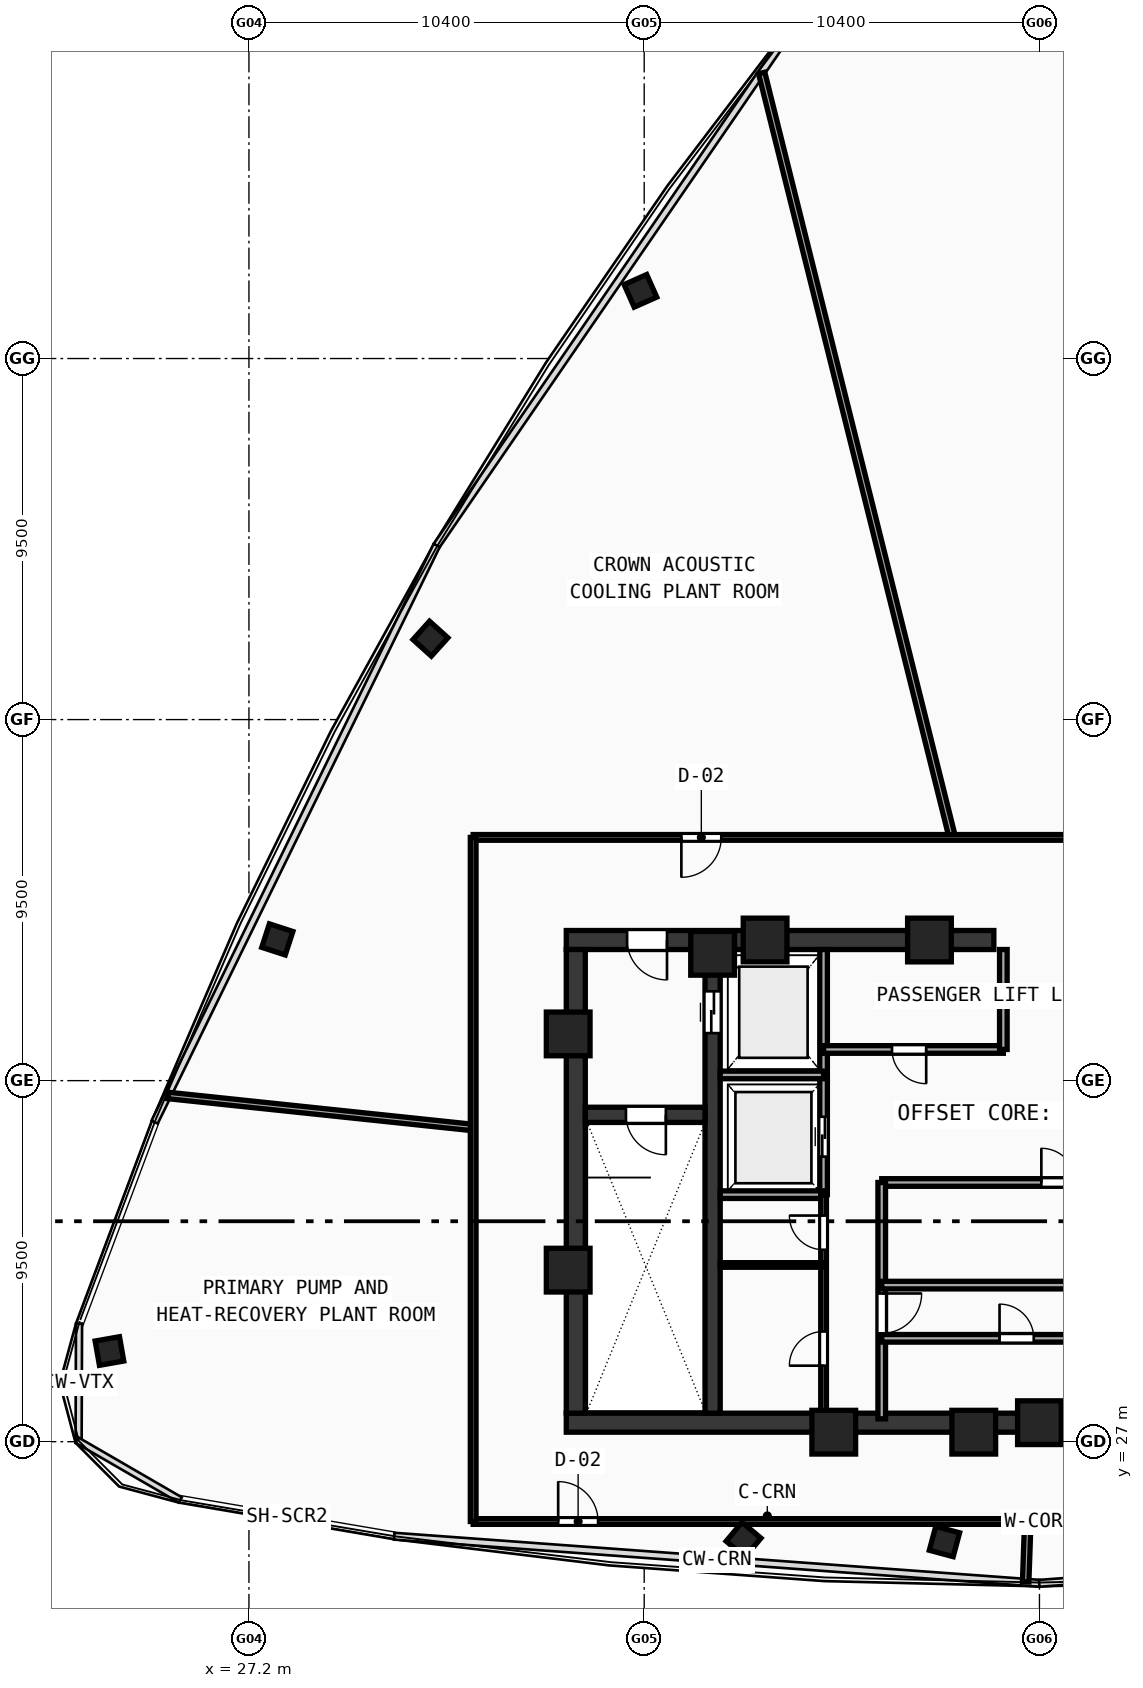
"""IFC4 building model, lengths in metres.
Left out: names, types, materials, properties, quantities, classifications, styles, units other than length and angle.
Written with IfcOpenShell. Run it as: python <this file> out.ifc"""

import sys

from ifc_helpers import new_model, si_unit, direction, frame, frame_2d, origin, origin_with_axes, origin_2d, place, context, subcontext, project, spatial, rectangle, hollow_rectangle, extrude, source, transform, mapped, element, fill, save


model = new_model("IFC4")
c1 = context("Model", 3, precision=1e-05, world=origin(), true_north=direction((0.0, 1.0)))
c2 = subcontext(c1, "Body", "Model", "MODEL_VIEW")
j1 = project(units=[si_unit("LENGTHUNIT", "METRE"), si_unit("PLANEANGLEUNIT", "RADIAN")], contexts=[c1])
p1 = place(None, origin())
s1 = spatial("IfcSite", under=j1, at=p1, CompositionType="ELEMENT")
p2 = place(p1, origin())
s2 = spatial("IfcBuilding", under=s1, at=p2, CompositionType="ELEMENT")
p3 = place(p2, frame((0.0, 0.0, 396.76)))
s3 = spatial("IfcBuildingStorey", under=s2, at=p3, CompositionType="ELEMENT", Elevation=396.76)
p4 = place(p3, frame((35.55, 27.5, 0.0), z_axis=(0.0, 0.0, 1.0), x_axis=(1.0, 0.0, 0.0)))
e1 = element("IfcWall", 1, at=p4, inside=s3, PredefinedType="SHEAR", context=c2, shape_type="SweptSolid", body=[
    extrude(rectangle(XDim=24.9, YDim=0.5, at=frame_2d((12.45, 0.0))), origin(), (0.0, 0.0, 1.0), 4.72),
])
p5 = place(p3, frame((35.55, 40.2, 0.0), z_axis=(0.0, 0.0, 1.0), x_axis=(1.0, 0.0, 0.0)))
e2 = element("IfcWall", 2, at=p5, inside=s3, PredefinedType="SHEAR", context=c2, shape_type="SweptSolid", body=[
    extrude(rectangle(XDim=11.25, YDim=0.5, at=frame_2d((5.625, 0.0))), origin(), (0.0, 0.0, 1.0), 4.72),
])
p6 = place(p5, frame((1.6, 0.0, 0.0)))
e3 = element("IfcOpeningElement", 3, at=p6, cuts=e2, PredefinedType="OPENING", context=c2, shape_type="SweptSolid", body=[
    extrude(rectangle(XDim=1.05, YDim=2.1, at=frame_2d((0.525, 1.05))), frame((0.0, 0.26, 0.0), z_axis=(0.0, -1.0, 0.0), x_axis=(1.0, 0.0, 0.0)), (0.0, 0.0, 1.0), 0.52),
])
p7 = place(p3, frame((35.8, 27.75, 0.0), z_axis=(0.0, 0.0, 1.0), x_axis=(0.0, 1.0, 0.0)))
e4 = element("IfcWall", 4, at=p7, inside=s3, PredefinedType="SHEAR", context=c2, shape_type="SweptSolid", body=[
    extrude(rectangle(XDim=12.2, YDim=0.5, at=frame_2d((6.1, 0.0))), origin(), (0.0, 0.0, 1.0), 4.72),
])
p8 = place(p3, frame((39.4, 27.75, 0.0), z_axis=(0.0, 0.0, 1.0), x_axis=(0.0, 1.0, 0.0)))
e5 = element("IfcWall", 5, at=p8, inside=s3, PredefinedType="SHEAR", context=c2, shape_type="SweptSolid", body=[
    extrude(rectangle(XDim=12.2, YDim=0.4, at=frame_2d((6.1, 0.0))), origin(), (0.0, 0.0, 1.0), 4.72),
])
p9 = place(p8, frame((10.0, 0.0, 0.0)))
e6 = element("IfcOpeningElement", 6, at=p9, cuts=e5, PredefinedType="OPENING", context=c2, shape_type="SweptSolid", body=[
    extrude(rectangle(XDim=1.1, YDim=2.1, at=frame_2d((0.55, 1.05))), frame((0.0, 0.21, 0.0), z_axis=(0.0, -1.0, 0.0), x_axis=(1.0, 0.0, 0.0)), (0.0, 0.0, 1.0), 0.42),
])
p10 = place(p3, frame((36.05, 35.6, 0.0), z_axis=(0.0, 0.0, 1.0), x_axis=(1.0, 0.0, 0.0)))
e7 = element("IfcWall", 7, at=p10, inside=s3, PredefinedType="SHEAR", context=c2, shape_type="SweptSolid", body=[
    extrude(rectangle(XDim=3.15, YDim=0.4, at=frame_2d((1.575, 0.0))), origin(), (0.0, 0.0, 1.0), 4.72),
])
p11 = place(p10, frame((1.07, 0.0, 0.0)))
e8 = element("IfcOpeningElement", 8, at=p11, cuts=e7, PredefinedType="OPENING", context=c2, shape_type="SweptSolid", body=[
    extrude(rectangle(XDim=1.05, YDim=2.1, at=frame_2d((0.525, 1.05))), frame((0.0, 0.21, 0.0), z_axis=(0.0, -1.0, 0.0), x_axis=(1.0, 0.0, 0.0)), (0.0, 0.0, 1.0), 0.42),
])
m1 = source(origin(), c2, "Body", "SweptSolid", [
    extrude(hollow_rectangle(XDim=1.15, YDim=1.15, WallThickness=0.048, at=origin_2d()), origin(), (0.0, 0.0, 1.0), 5.0),
])
for number, where, z_axis, x_axis in (
    (9, (42.588, 27.25, -0.28), (0.0, 0.0, 1.0), (1.0, 0.0, 0.0)),
    (10, (46.272, 27.25, -0.28), (0.0, 0.0, 1.0), (1.0, 0.0, 0.0)),
    (11, (45.106, 40.2, -0.28), (0.0, 0.0, 1.0), (1.0, 0.0, 0.0)),
    (12, (40.781, 40.2, -0.28), (0.0, 0.0, 1.0), (1.0, 0.0, 0.0)),
    (13, (35.6, 37.729, -0.28), (0.0, 0.0, 1.0), (1.0, 0.0, 0.0)),
    (14, (35.6, 31.513, -0.28), (0.0, 0.0, 1.0), (1.0, 0.0, 0.0)),
):
    element("IfcColumn", number, at=place(p3, frame(where, z_axis=z_axis, x_axis=x_axis)), inside=s3, PredefinedType="COLUMN", context=c2, shape_type="MappedRepresentation", body=[
        mapped(m1, transform((0.0, 0.0, 0.0), scale=1.0)),
    ])
m2 = source(origin(), c2, "Body", "SweptSolid", [
    extrude(hollow_rectangle(XDim=0.65, YDim=0.65, WallThickness=0.024, at=origin_2d()), origin(), (0.0, 0.0, 1.0), 5.0),
])
for number, where, z_axis, x_axis in (
    (15, (40.215, 24.422, -0.28), (0.0, 0.0, 1.0), (0.766, -0.643, 0.0)),
    (16, (45.501, 24.373, -0.28), (0.0, 0.0, 1.0), (0.966, -0.259, 0.0)),
    (17, (37.501, 57.281, -0.28), (0.0, 0.0, 1.0), (-0.914, -0.407, 0.0)),
    (18, (31.975, 48.129, -0.28), (0.0, 0.0, 1.0), (-0.669, -0.743, 0.0)),
    (19, (27.947, 40.216, -0.28), (0.0, 0.0, 1.0), (-0.309, -0.951, 0.0)),
    (20, (23.53, 29.385, -0.28), (0.0, 0.0, 1.0), (0.174, -0.985, 0.0)),
):
    element("IfcColumn", number, at=place(p3, frame(where, z_axis=z_axis, x_axis=x_axis)), inside=s3, PredefinedType="COLUMN", context=c2, shape_type="MappedRepresentation", body=[
        mapped(m2, transform((0.0, 0.0, 0.0), scale=1.0)),
    ])
for number, where, z_axis, x_axis in (
    (21, (39.4, 39.85, -0.28), (0.0, 0.0, 1.0), (1.0, 0.0, 0.0)),
    (22, (48.0, 27.5, -0.28), (0.0, 0.0, 1.0), (1.0, 0.0, 0.0)),
):
    element("IfcColumn", number, at=place(p3, frame(where, z_axis=z_axis, x_axis=x_axis)), inside=s3, PredefinedType="COLUMN", context=c2, shape_type="MappedRepresentation", body=[
        mapped(m1, transform((0.0, 0.0, 0.0), scale=1.0)),
    ])
p12 = place(p3, frame((42.32, 33.5, 0.0), z_axis=(0.0, 0.0, 1.0), x_axis=(0.0, 1.0, 0.0)))
e23 = element("IfcWall", 23, at=p12, inside=s3, PredefinedType="SOLIDWALL", context=c2, shape_type="SweptSolid", body=[
    extrude(rectangle(XDim=6.45, YDim=0.2, at=frame_2d((3.225, 0.0))), origin(), (0.0, 0.0, 1.0), 4.72),
])
p13 = place(p12, frame((1.0, 0.0, 0.0)))
e24 = element("IfcOpeningElement", 24, at=p13, cuts=e23, PredefinedType="OPENING", context=c2, shape_type="SweptSolid", body=[
    extrude(rectangle(XDim=1.05, YDim=2.1, at=frame_2d((0.525, 1.05))), frame((0.0, 0.11, 0.0), z_axis=(0.0, -1.0, 0.0), x_axis=(1.0, 0.0, 0.0)), (0.0, 0.0, 1.0), 0.22),
])
for number, where, z_axis, x_axis in (
    (25, (39.6, 36.65, 0.0), (0.0, 0.0, 1.0), (1.0, 0.0, 0.0)),
    (26, (39.6, 33.5, 0.0), (0.0, 0.0, 1.0), (1.0, 0.0, 0.0)),
):
    element("IfcWall", number, at=place(p3, frame(where, z_axis=z_axis, x_axis=x_axis)), inside=s3, PredefinedType="SOLIDWALL", context=c2, shape_type="SweptSolid", body=[
        extrude(rectangle(XDim=2.72, YDim=0.2, at=frame_2d((1.36, 0.0))), origin(), (0.0, 0.0, 1.0), 4.72),
    ])
p14 = place(p3, frame((42.32, 37.32, 0.0), z_axis=(0.0, 0.0, 1.0), x_axis=(1.0, 0.0, 0.0)))
e27 = element("IfcWall", 27, at=p14, inside=s3, PredefinedType="SOLIDWALL", context=c2, shape_type="SweptSolid", body=[
    extrude(rectangle(XDim=4.73, YDim=0.2, at=frame_2d((2.365, 0.0))), origin(), (0.0, 0.0, 1.0), 4.72),
])
p15 = place(p14, frame((1.8, 0.0, 0.0)))
e28 = element("IfcOpeningElement", 28, at=p15, cuts=e27, PredefinedType="OPENING", context=c2, shape_type="SweptSolid", body=[
    extrude(rectangle(XDim=0.9, YDim=2.1, at=frame_2d((0.45, 1.05))), frame((0.0, 0.11, 0.0), z_axis=(0.0, -1.0, 0.0), x_axis=(1.0, 0.0, 0.0)), (0.0, 0.0, 1.0), 0.22),
])
p16 = place(p3, frame((47.05, 37.32, 0.0), z_axis=(0.0, 0.0, 1.0), x_axis=(0.0, 1.0, 0.0)))
e29 = element("IfcWall", 29, at=p16, inside=s3, PredefinedType="SOLIDWALL", context=c2, shape_type="SweptSolid", body=[
    extrude(rectangle(XDim=2.63, YDim=0.2, at=frame_2d((1.315, 0.0))), origin(), (0.0, 0.0, 1.0), 4.72),
])
p17 = place(p3, frame((43.85, 33.82, 0.0), z_axis=(0.0, 0.0, 1.0), x_axis=(1.0, 0.0, 0.0)))
e30 = element("IfcWall", 30, at=p17, inside=s3, PredefinedType="SOLIDWALL", context=c2, shape_type="SweptSolid", body=[
    extrude(rectangle(XDim=9.83, YDim=0.2, at=frame_2d((4.915, 0.0))), origin(), (0.0, 0.0, 1.0), 4.72),
])
p18 = place(p17, frame((4.2, 0.0, 0.0)))
e31 = element("IfcOpeningElement", 31, at=p18, cuts=e30, PredefinedType="OPENING", context=c2, shape_type="SweptSolid", body=[
    extrude(rectangle(XDim=0.9, YDim=2.1, at=frame_2d((0.45, 1.05))), frame((0.0, 0.11, 0.0), z_axis=(0.0, -1.0, 0.0), x_axis=(1.0, 0.0, 0.0)), (0.0, 0.0, 1.0), 0.22),
])
p19 = place(p3, frame((43.85, 27.6, 0.0), z_axis=(0.0, 0.0, 1.0), x_axis=(0.0, 1.0, 0.0)))
e32 = element("IfcWall", 32, at=p19, inside=s3, PredefinedType="SOLIDWALL", context=c2, shape_type="SweptSolid", body=[
    extrude(rectangle(XDim=6.22, YDim=0.2, at=frame_2d((3.11, 0.0))), origin(), (0.0, 0.0, 1.0), 4.72),
])
p20 = place(p19, frame((2.25, 0.0, 0.0)))
e33 = element("IfcOpeningElement", 33, at=p20, cuts=e32, PredefinedType="OPENING", context=c2, shape_type="SweptSolid", body=[
    extrude(rectangle(XDim=1.05, YDim=2.1, at=frame_2d((0.525, 1.05))), frame((0.0, 0.11, 0.0), z_axis=(0.0, -1.0, 0.0), x_axis=(1.0, 0.0, 0.0)), (0.0, 0.0, 1.0), 0.22),
])
p21 = place(p3, frame((43.85, 29.72, 0.0), z_axis=(0.0, 0.0, 1.0), x_axis=(1.0, 0.0, 0.0)))
e34 = element("IfcWall", 34, at=p21, inside=s3, PredefinedType="SOLIDWALL", context=c2, shape_type="SweptSolid", body=[
    extrude(rectangle(XDim=7.2, YDim=0.2, at=frame_2d((3.6, 0.0))), origin(), (0.0, 0.0, 1.0), 4.72),
])
p22 = place(p21, frame((3.1, 0.0, 0.0)))
e35 = element("IfcOpeningElement", 35, at=p22, cuts=e34, PredefinedType="OPENING", context=c2, shape_type="SweptSolid", body=[
    extrude(rectangle(XDim=0.9, YDim=2.1, at=frame_2d((0.45, 1.05))), frame((0.0, 0.11, 0.0), z_axis=(0.0, -1.0, 0.0), x_axis=(1.0, 0.0, 0.0)), (0.0, 0.0, 1.0), 0.22),
])
p23 = place(p3, frame((43.85, 31.12, 0.0), z_axis=(0.0, 0.0, 1.0), x_axis=(1.0, 0.0, 0.0)))
e36 = element("IfcWall", 36, at=p23, inside=s3, PredefinedType="SOLIDWALL", context=c2, shape_type="SweptSolid", body=[
    extrude(rectangle(XDim=9.83, YDim=0.2, at=frame_2d((4.915, 0.0))), origin(), (0.0, 0.0, 1.0), 4.72),
])
p24 = place(p3, frame((42.32, 27.6, 0.0), z_axis=(0.0, 0.0, 1.0), x_axis=(0.0, 1.0, 0.0)))
e37 = element("IfcWall", 37, at=p24, inside=s3, PredefinedType="PARTITIONING", context=c2, shape_type="SweptSolid", body=[
    extrude(rectangle(XDim=5.9, YDim=0.15, at=frame_2d((2.95, 0.0))), origin(), (0.0, 0.0, 1.0), 4.72),
])
p25 = place(p24, frame((1.4, 0.0, 0.0)))
e38 = element("IfcOpeningElement", 38, at=p25, cuts=e37, PredefinedType="OPENING", context=c2, shape_type="SweptSolid", body=[
    extrude(rectangle(XDim=0.9, YDim=2.1, at=frame_2d((0.45, 1.05))), frame((0.0, 0.085, 0.0), z_axis=(0.0, -1.0, 0.0), x_axis=(1.0, 0.0, 0.0)), (0.0, 0.0, 1.0), 0.17),
])
p26 = place(p24, frame((4.45, 0.0, 0.0)))
e39 = element("IfcOpeningElement", 39, at=p26, cuts=e37, PredefinedType="OPENING", context=c2, shape_type="SweptSolid", body=[
    extrude(rectangle(XDim=0.9, YDim=2.1, at=frame_2d((0.45, 1.05))), frame((0.0, 0.085, 0.0), z_axis=(0.0, -1.0, 0.0), x_axis=(1.0, 0.0, 0.0)), (0.0, 0.0, 1.0), 0.17),
])
p27 = place(p3, frame((39.6, 31.65, 0.0), z_axis=(0.0, 0.0, 1.0), x_axis=(1.0, 0.0, 0.0)))
e40 = element("IfcWall", 40, at=p27, inside=s3, PredefinedType="PARTITIONING", context=c2, shape_type="SweptSolid", body=[
    extrude(rectangle(XDim=2.72, YDim=0.12, at=frame_2d((1.36, 0.0))), origin(), (0.0, 0.0, 1.0), 4.72),
])
p28 = place(p3, frame((45.706, 42.9, 0.0), z_axis=(0.0, 0.0, 1.0), x_axis=(-0.241925907535, 0.970294725979, 0.0)))
e41 = element("IfcWall", 41, at=p28, inside=s3, PredefinedType="PARTITIONING", context=c2, shape_type="SweptSolid", body=[
    extrude(rectangle(XDim=20.729, YDim=0.17, at=frame_2d((10.365, 0.0))), origin(), (0.0, 0.0, 1.0), 4.12),
])
p29 = place(p3, frame((33.1, 35.266, 0.0), z_axis=(0.0, 0.0, 1.0), x_axis=(-0.994521682688, 0.104530486767, 0.0)))
e42 = element("IfcWall", 42, at=p29, inside=s3, PredefinedType="PARTITIONING", context=c2, shape_type="SweptSolid", body=[
    extrude(rectangle(XDim=8.072, YDim=0.17, at=frame_2d((4.036, 0.0))), origin(), (0.0, 0.0, 1.0), 4.12),
])
p30 = place(p3, frame((47.693, 24.9, 0.0), z_axis=(0.0, 0.0, 1.0), x_axis=(-0.034853599834, -0.999392428718, 0.0)))
e43 = element("IfcWall", 43, at=p30, inside=s3, PredefinedType="PARTITIONING", context=c2, shape_type="SweptSolid", body=[
    extrude(rectangle(XDim=1.59, YDim=0.17, at=frame_2d((0.795, 0.0))), origin(), (0.0, 0.0, 1.0), 4.12),
])
p31 = place(p3, frame((33.1, 24.9, 0.0), z_axis=(0.0, 0.0, 1.0), x_axis=(1.0, 0.0, 0.0)))
e44 = element("IfcWall", 44, at=p31, inside=s3, PredefinedType="PARTITIONING", context=c2, shape_type="SweptSolid", body=[
    extrude(rectangle(XDim=29.8, YDim=0.15, at=frame_2d((14.9, 0.0))), origin(), (0.0, 0.0, 1.0), 4.12),
])
p32 = place(p31, frame((2.236, 0.0, 0.0)))
e45 = element("IfcOpeningElement", 45, at=p32, cuts=e44, PredefinedType="OPENING", context=c2, shape_type="SweptSolid", body=[
    extrude(rectangle(XDim=1.05, YDim=2.1, at=frame_2d((0.525, 1.05))), frame((0.0, 0.085, 0.0), z_axis=(0.0, -1.0, 0.0), x_axis=(1.0, 0.0, 0.0)), (0.0, 0.0, 1.0), 0.17),
])
p33 = place(p31, frame((26.514, 0.0, 0.0)))
e46 = element("IfcOpeningElement", 46, at=p33, cuts=e44, PredefinedType="OPENING", context=c2, shape_type="SweptSolid", body=[
    extrude(rectangle(XDim=1.05, YDim=2.1, at=frame_2d((0.525, 1.05))), frame((0.0, 0.085, 0.0), z_axis=(0.0, -1.0, 0.0), x_axis=(1.0, 0.0, 0.0)), (0.0, 0.0, 1.0), 0.17),
])
p34 = place(p3, frame((62.9, 42.9, 0.0), z_axis=(0.0, 0.0, 1.0), x_axis=(-1.0, 0.0, 0.0)))
e47 = element("IfcWall", 47, at=p34, inside=s3, PredefinedType="PARTITIONING", context=c2, shape_type="SweptSolid", body=[
    extrude(rectangle(XDim=29.8, YDim=0.15, at=frame_2d((14.9, 0.0))), origin(), (0.0, 0.0, 1.0), 4.12),
])
p35 = place(p34, frame((7.772, 0.0, 0.0)))
e48 = element("IfcOpeningElement", 48, at=p35, cuts=e47, PredefinedType="OPENING", context=c2, shape_type="SweptSolid", body=[
    extrude(rectangle(XDim=1.05, YDim=2.1, at=frame_2d((0.525, 1.05))), frame((0.0, 0.085, 0.0), z_axis=(0.0, -1.0, 0.0), x_axis=(1.0, 0.0, 0.0)), (0.0, 0.0, 1.0), 0.17),
])
p36 = place(p34, frame((23.272, 0.0, 0.0)))
e49 = element("IfcOpeningElement", 49, at=p36, cuts=e47, PredefinedType="OPENING", context=c2, shape_type="SweptSolid", body=[
    extrude(rectangle(XDim=1.05, YDim=2.1, at=frame_2d((0.525, 1.05))), frame((0.0, 0.085, 0.0), z_axis=(0.0, -1.0, 0.0), x_axis=(1.0, 0.0, 0.0)), (0.0, 0.0, 1.0), 0.17),
])
p37 = place(p3, frame((33.1, 42.9, 0.0), z_axis=(0.0, 0.0, 1.0), x_axis=(0.0, -1.0, 0.0)))
e50 = element("IfcWall", 50, at=p37, inside=s3, PredefinedType="PARTITIONING", context=c2, shape_type="SweptSolid", body=[
    extrude(rectangle(XDim=18.0, YDim=0.15, at=frame_2d((9.0, 0.0))), origin(), (0.0, 0.0, 1.0), 4.12),
])
m3 = source(origin(), c2, "Body", "SweptSolid", [
    extrude(rectangle(XDim=1.05, YDim=2.1, at=frame_2d((0.525, 1.05))), frame((0.0, 0.025, 0.0), z_axis=(0.0, -1.0, 0.0), x_axis=(1.0, 0.0, 0.0)), (0.0, 0.0, 1.0), 0.05),
])
p38 = place(p11, frame((1.05, 0.0, 0.0), z_axis=(0.0, 0.0, 1.0), x_axis=(-1.0, 0.0, 0.0)))
e51 = element("IfcDoor", 51, at=p38, inside=s3, OperationType="SINGLE_SWING_LEFT", PredefinedType="DOOR", context=c2, shape_type="MappedRepresentation", body=[
    mapped(m3, transform((0.0, 0.0, 0.0), scale=1.0)),
])
fill(e8, e51)
p39 = place(p6, frame((1.05, 0.0, 0.0), z_axis=(0.0, 0.0, 1.0), x_axis=(-1.0, 0.0, 0.0)))
e52 = element("IfcDoor", 52, at=p39, inside=s3, OperationType="SINGLE_SWING_LEFT", PredefinedType="DOOR", context=c2, shape_type="MappedRepresentation", body=[
    mapped(m3, transform((0.0, 0.0, 0.0), scale=1.0)),
])
fill(e3, e52)
m4 = source(origin(), c2, "Body", "SweptSolid", [
    extrude(rectangle(XDim=1.1, YDim=2.1, at=frame_2d((0.55, 1.05))), frame((0.0, 0.025, 0.0), z_axis=(0.0, -1.0, 0.0), x_axis=(1.0, 0.0, 0.0)), (0.0, 0.0, 1.0), 0.05),
])
p40 = place(p9, frame((1.1, 0.0, 0.0), z_axis=(0.0, 0.0, 1.0), x_axis=(-1.0, 0.0, 0.0)))
e53 = element("IfcDoor", 53, at=p40, inside=s3, OperationType="DOUBLE_DOOR_SLIDING", PredefinedType="DOOR", context=c2, shape_type="MappedRepresentation", body=[
    mapped(m4, transform((0.0, 0.0, 0.0), scale=1.0)),
])
fill(e6, e53)
p41 = place(p13, origin_with_axes())
e54 = element("IfcDoor", 54, at=p41, inside=s3, OperationType="DOUBLE_DOOR_SLIDING", PredefinedType="DOOR", context=c2, shape_type="MappedRepresentation", body=[
    mapped(m3, transform((0.0, 0.0, 0.0), scale=1.0)),
])
fill(e24, e54)
m5 = source(origin(), c2, "Body", "SweptSolid", [
    extrude(rectangle(XDim=0.9, YDim=2.1, at=frame_2d((0.45, 1.05))), frame((0.0, 0.025, 0.0), z_axis=(0.0, -1.0, 0.0), x_axis=(1.0, 0.0, 0.0)), (0.0, 0.0, 1.0), 0.05),
])
p42 = place(p15, frame((0.9, 0.0, 0.0), z_axis=(0.0, 0.0, 1.0), x_axis=(-1.0, 0.0, 0.0)))
e55 = element("IfcDoor", 55, at=p42, inside=s3, OperationType="SINGLE_SWING_LEFT", PredefinedType="DOOR", context=c2, shape_type="MappedRepresentation", body=[
    mapped(m5, transform((0.0, 0.0, 0.0), scale=1.0)),
])
fill(e28, e55)
p43 = place(p18, origin_with_axes())
e56 = element("IfcDoor", 56, at=p43, inside=s3, OperationType="SINGLE_SWING_LEFT", PredefinedType="DOOR", context=c2, shape_type="MappedRepresentation", body=[
    mapped(m5, transform((0.0, 0.0, 0.0), scale=1.0)),
])
fill(e31, e56)
p44 = place(p20, frame((1.05, 0.0, 0.0), z_axis=(0.0, 0.0, 1.0), x_axis=(-1.0, 0.0, 0.0)))
e57 = element("IfcDoor", 57, at=p44, inside=s3, OperationType="SINGLE_SWING_LEFT", PredefinedType="DOOR", context=c2, shape_type="MappedRepresentation", body=[
    mapped(m3, transform((0.0, 0.0, 0.0), scale=1.0)),
])
fill(e33, e57)
p45 = place(p22, origin_with_axes())
e58 = element("IfcDoor", 58, at=p45, inside=s3, OperationType="SINGLE_SWING_LEFT", PredefinedType="DOOR", context=c2, shape_type="MappedRepresentation", body=[
    mapped(m5, transform((0.0, 0.0, 0.0), scale=1.0)),
])
fill(e35, e58)
p46 = place(p25, origin_with_axes())
e59 = element("IfcDoor", 59, at=p46, inside=s3, OperationType="SINGLE_SWING_LEFT", PredefinedType="DOOR", context=c2, shape_type="MappedRepresentation", body=[
    mapped(m5, transform((0.0, 0.0, 0.0), scale=1.0)),
])
fill(e38, e59)
p47 = place(p26, origin_with_axes())
e60 = element("IfcDoor", 60, at=p47, inside=s3, OperationType="SINGLE_SWING_RIGHT", PredefinedType="DOOR", context=c2, shape_type="MappedRepresentation", body=[
    mapped(m5, transform((0.0, 0.0, 0.0), scale=1.0)),
])
fill(e39, e60)
p48 = place(p36, origin_with_axes())
e61 = element("IfcDoor", 61, at=p48, inside=s3, OperationType="SINGLE_SWING_RIGHT", PredefinedType="DOOR", context=c2, shape_type="MappedRepresentation", body=[
    mapped(m3, transform((0.0, 0.0, 0.0), scale=1.0)),
])
fill(e49, e61)
p49 = place(p32, origin_with_axes())
e62 = element("IfcDoor", 62, at=p49, inside=s3, OperationType="SINGLE_SWING_LEFT", PredefinedType="DOOR", context=c2, shape_type="MappedRepresentation", body=[
    mapped(m3, transform((0.0, 0.0, 0.0), scale=1.0)),
])
fill(e45, e62)
save(model, sys.argv[1])
